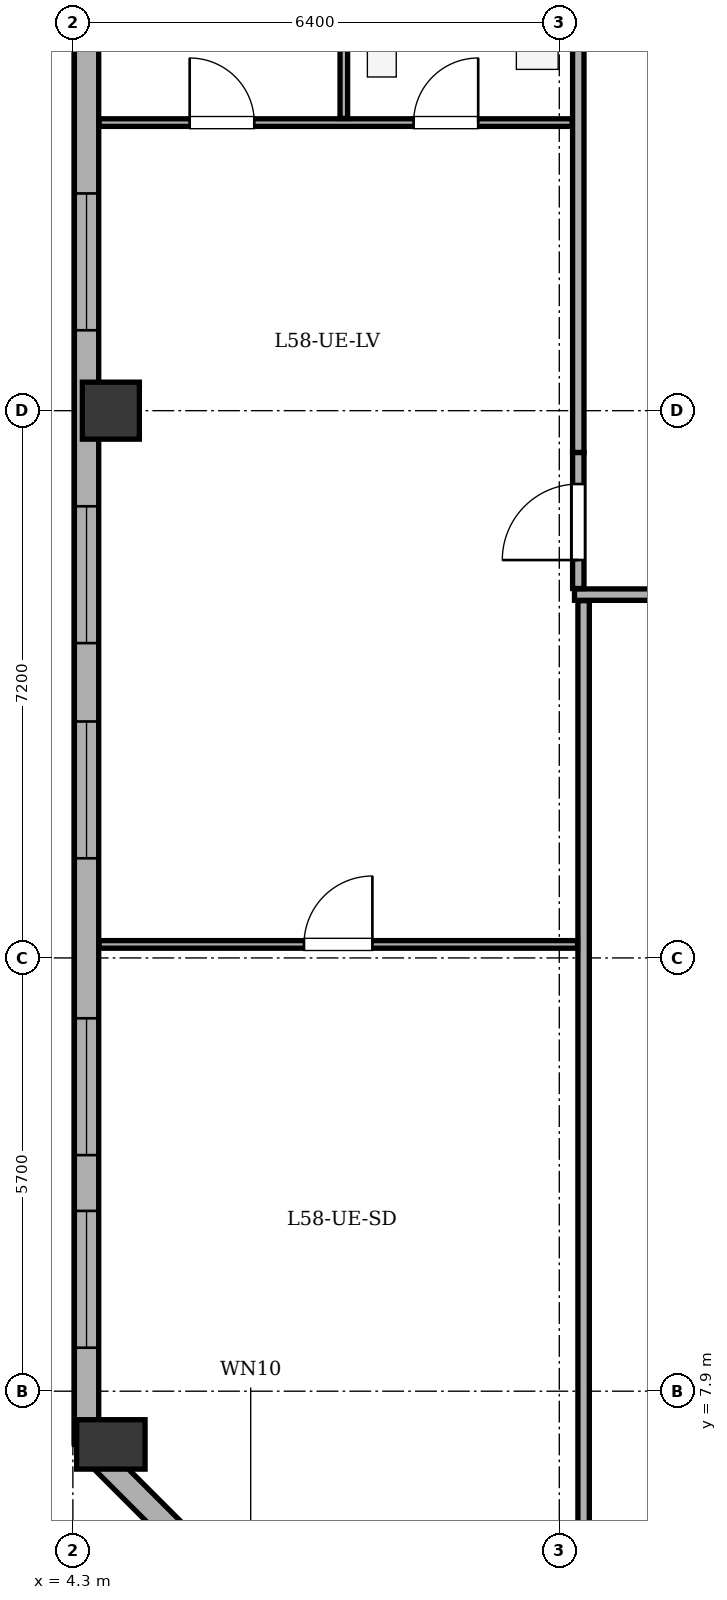
"""IFC4 building model, lengths in metres.
Left out: names, types, materials, properties, quantities, classifications, styles, units other than length and angle.
Written with IfcOpenShell. Run it as: python <this file> out.ifc"""

import sys

from ifc_helpers import new_model, si_unit, direction, frame, frame_2d, origin, origin_2d, place, context, subcontext, project, spatial, rectangle, extrude, element, fill, save


model = new_model("IFC4")
c1 = context("Model", 3, precision=1e-05, world=origin(), true_north=direction((0.0, 1.0)))
c2 = subcontext(c1, "Body", "Model", "MODEL_VIEW")
j1 = project(units=[si_unit("LENGTHUNIT", "METRE"), si_unit("PLANEANGLEUNIT", "RADIAN")], contexts=[c1])
p1 = place(None, origin())
s1 = spatial("IfcSite", under=j1, at=p1, CompositionType="ELEMENT")
p2 = place(p1, origin())
s2 = spatial("IfcBuilding", under=s1, at=p2, CompositionType="ELEMENT")
p3 = place(p2, frame((0.0, 0.0, 224.5)))
s3 = spatial("IfcBuildingStorey", under=s2, at=p3, CompositionType="ELEMENT", Elevation=224.5)
p4 = place(p3, frame((4.8, 7.2, 0.0), z_axis=(0.0, 0.0, 1.0), x_axis=(1.0, 0.0, 0.0)))
e1 = element("IfcColumn", 1, at=p4, inside=s3, PredefinedType="COLUMN", context=c2, shape_type="SweptSolid", body=[
    extrude(rectangle(XDim=0.65, YDim=0.9, at=origin_2d()), origin(), (0.0, 0.0, 1.0), 3.4),
])
p5 = place(p3, frame((4.8, 20.8, 0.0), z_axis=(0.0, 0.0, 1.0), x_axis=(1.0, 0.0, 0.0)))
e2 = element("IfcColumn", 2, at=p5, inside=s3, PredefinedType="COLUMN", context=c2, shape_type="SweptSolid", body=[
    extrude(rectangle(XDim=0.75, YDim=0.75, at=origin_2d()), origin(), (0.0, 0.0, 1.0), 3.4),
])
p6 = place(p3, frame((8.8, 2.88, 0.0), z_axis=(0.0, 0.0, 1.0), x_axis=(-0.707106781187, 0.707106781187, 0.0)))
e3 = element("IfcWall", 3, at=p6, inside=s3, PredefinedType="STANDARD", context=c2, shape_type="SweptSolid", body=[
    extrude(rectangle(XDim=6.11, YDim=0.32, at=frame_2d((3.055, 0.0))), origin(), (0.0, 0.0, 1.0), 2.335),
])
p7 = place(p6, frame((2.355, 0.0, 0.75)))
e4 = element("IfcOpeningElement", 4, at=p7, cuts=e3, PredefinedType="OPENING", context=c2, shape_type="SweptSolid", body=[
    extrude(rectangle(XDim=1.4, YDim=1.465, at=frame_2d((0.7, 0.732))), frame((0.0, 0.17, 0.0), z_axis=(0.0, -1.0, 0.0), x_axis=(1.0, 0.0, 0.0)), (0.0, 0.0, 1.0), 0.34),
])
p8 = place(p3, frame((4.48, 7.2, 0.0), z_axis=(0.0, 0.0, 1.0), x_axis=(0.0, 1.0, 0.0)))
e5 = element("IfcWall", 5, at=p8, inside=s3, PredefinedType="STANDARD", context=c2, shape_type="SweptSolid", body=[
    extrude(rectangle(XDim=27.8, YDim=0.32, at=frame_2d((13.9, 0.0))), origin(), (0.0, 0.0, 1.0), 2.335),
])
p9 = place(p8, frame((1.272, 0.0, 0.75)))
e6 = element("IfcOpeningElement", 6, at=p9, cuts=e5, PredefinedType="OPENING", context=c2, shape_type="SweptSolid", body=[
    extrude(rectangle(XDim=1.8, YDim=1.465, at=frame_2d((0.9, 0.732))), frame((0.0, 0.17, 0.0), z_axis=(0.0, -1.0, 0.0), x_axis=(1.0, 0.0, 0.0)), (0.0, 0.0, 1.0), 0.34),
])
p10 = place(p8, frame((3.806, 0.0, 0.75)))
e7 = element("IfcOpeningElement", 7, at=p10, cuts=e5, PredefinedType="OPENING", context=c2, shape_type="SweptSolid", body=[
    extrude(rectangle(XDim=1.8, YDim=1.465, at=frame_2d((0.9, 0.732))), frame((0.0, 0.17, 0.0), z_axis=(0.0, -1.0, 0.0), x_axis=(1.0, 0.0, 0.0)), (0.0, 0.0, 1.0), 0.34),
])
p11 = place(p8, frame((7.711, 0.0, 0.75)))
e8 = element("IfcOpeningElement", 8, at=p11, cuts=e5, PredefinedType="OPENING", context=c2, shape_type="SweptSolid", body=[
    extrude(rectangle(XDim=1.8, YDim=1.465, at=frame_2d((0.9, 0.732))), frame((0.0, 0.17, 0.0), z_axis=(0.0, -1.0, 0.0), x_axis=(1.0, 0.0, 0.0)), (0.0, 0.0, 1.0), 0.34),
])
p12 = place(p8, frame((10.542, 0.0, 0.75)))
e9 = element("IfcOpeningElement", 9, at=p12, cuts=e5, PredefinedType="OPENING", context=c2, shape_type="SweptSolid", body=[
    extrude(rectangle(XDim=1.8, YDim=1.465, at=frame_2d((0.9, 0.732))), frame((0.0, 0.17, 0.0), z_axis=(0.0, -1.0, 0.0), x_axis=(1.0, 0.0, 0.0)), (0.0, 0.0, 1.0), 0.34),
])
p13 = place(p8, frame((14.658, 0.0, 0.75)))
e10 = element("IfcOpeningElement", 10, at=p13, cuts=e5, PredefinedType="OPENING", context=c2, shape_type="SweptSolid", body=[
    extrude(rectangle(XDim=1.8, YDim=1.465, at=frame_2d((0.9, 0.732))), frame((0.0, 0.17, 0.0), z_axis=(0.0, -1.0, 0.0), x_axis=(1.0, 0.0, 0.0)), (0.0, 0.0, 1.0), 0.34),
])
p14 = place(p8, frame((23.543, 0.0, 0.75)))
e11 = element("IfcOpeningElement", 11, at=p14, cuts=e5, PredefinedType="OPENING", context=c2, shape_type="SweptSolid", body=[
    extrude(rectangle(XDim=1.8, YDim=1.465, at=frame_2d((0.9, 0.732))), frame((0.0, 0.17, 0.0), z_axis=(0.0, -1.0, 0.0), x_axis=(1.0, 0.0, 0.0)), (0.0, 0.0, 1.0), 0.34),
])
p15 = place(p3, frame((10.9, 18.38, 0.0), z_axis=(0.0, 0.0, 1.0), x_axis=(1.0, 0.0, 0.0)))
e12 = element("IfcWall", 12, at=p15, inside=s3, PredefinedType="PARTITIONING", context=c2, shape_type="SweptSolid", body=[
    extrude(rectangle(XDim=34.02, YDim=0.15, at=frame_2d((17.01, 0.0))), origin(), (0.0, 0.0, 1.0), 2.95),
])
p16 = place(p15, frame((2.774, 0.0, 0.0)))
e13 = element("IfcOpeningElement", 13, at=p16, cuts=e12, PredefinedType="OPENING", context=c2, shape_type="SweptSolid", body=[
    extrude(rectangle(XDim=1.0, YDim=2.1, at=frame_2d((0.5, 1.05))), frame((0.0, 0.085, 0.0), z_axis=(0.0, -1.0, 0.0), x_axis=(1.0, 0.0, 0.0)), (0.0, 0.0, 1.0), 0.17),
])
p17 = place(p15, frame((12.118, 0.0, 0.0)))
e14 = element("IfcOpeningElement", 14, at=p17, cuts=e12, PredefinedType="OPENING", context=c2, shape_type="SweptSolid", body=[
    extrude(rectangle(XDim=1.0, YDim=2.1, at=frame_2d((0.5, 1.05))), frame((0.0, 0.085, 0.0), z_axis=(0.0, -1.0, 0.0), x_axis=(1.0, 0.0, 0.0)), (0.0, 0.0, 1.0), 0.17),
])
p18 = place(p15, frame((20.901, 0.0, 0.0)))
e15 = element("IfcOpeningElement", 15, at=p18, cuts=e12, PredefinedType="OPENING", context=c2, shape_type="SweptSolid", body=[
    extrude(rectangle(XDim=1.0, YDim=2.1, at=frame_2d((0.5, 1.05))), frame((0.0, 0.085, 0.0), z_axis=(0.0, -1.0, 0.0), x_axis=(1.0, 0.0, 0.0)), (0.0, 0.0, 1.0), 0.17),
])
p19 = place(p15, frame((29.346, 0.0, 0.0)))
e16 = element("IfcOpeningElement", 16, at=p19, cuts=e12, PredefinedType="OPENING", context=c2, shape_type="SweptSolid", body=[
    extrude(rectangle(XDim=1.0, YDim=2.1, at=frame_2d((0.5, 1.05))), frame((0.0, 0.085, 0.0), z_axis=(0.0, -1.0, 0.0), x_axis=(1.0, 0.0, 0.0)), (0.0, 0.0, 1.0), 0.17),
])
p20 = place(p3, frame((11.02, 3.045, 0.0), z_axis=(0.0, 0.0, 1.0), x_axis=(0.0, 1.0, 0.0)))
e17 = element("IfcWall", 17, at=p20, inside=s3, PredefinedType="PARTITIONING", context=c2, shape_type="SweptSolid", body=[
    extrude(rectangle(XDim=15.255, YDim=0.15, at=frame_2d((7.627, 0.0))), origin(), (0.0, 0.0, 1.0), 2.335),
])
p21 = place(p3, frame((10.95, 18.46, 0.0), z_axis=(0.0, 0.0, 1.0), x_axis=(0.0, 1.0, 0.0)))
e18 = element("IfcWall", 18, at=p21, inside=s3, PredefinedType="PARTITIONING", context=c2, shape_type="SweptSolid", body=[
    extrude(rectangle(XDim=1.79, YDim=0.15, at=frame_2d((0.895, 0.0))), origin(), (0.0, 0.0, 1.0), 2.335),
])
p22 = place(p21, frame((0.375, 0.0, 0.0)))
e19 = element("IfcOpeningElement", 19, at=p22, cuts=e18, PredefinedType="OPENING", context=c2, shape_type="SweptSolid", body=[
    extrude(rectangle(XDim=1.0, YDim=2.1, at=frame_2d((0.5, 1.05))), frame((0.0, 0.085, 0.0), z_axis=(0.0, -1.0, 0.0), x_axis=(1.0, 0.0, 0.0)), (0.0, 0.0, 1.0), 0.17),
])
p23 = place(p3, frame((10.95, 20.25, 0.0), z_axis=(0.0, 0.0, 1.0), x_axis=(0.0, 1.0, 0.0)))
e20 = element("IfcWall", 20, at=p23, inside=s3, PredefinedType="PARTITIONING", context=c2, shape_type="SweptSolid", body=[
    extrude(rectangle(XDim=13.9, YDim=0.15, at=frame_2d((6.95, 0.0))), origin(), (0.0, 0.0, 1.0), 2.335),
])
p24 = place(p3, frame((4.645, 24.59, 0.0), z_axis=(0.0, 0.0, 1.0), x_axis=(1.0, 0.0, 0.0)))
e21 = element("IfcWall", 21, at=p24, inside=s3, PredefinedType="PARTITIONING", context=c2, shape_type="SweptSolid", body=[
    extrude(rectangle(XDim=6.225, YDim=0.1, at=frame_2d((3.113, 0.0))), origin(), (0.0, 0.0, 1.0), 2.95),
])
p25 = place(p24, frame((1.192, 0.0, 0.0)))
e22 = element("IfcOpeningElement", 22, at=p25, cuts=e21, PredefinedType="OPENING", context=c2, shape_type="SweptSolid", body=[
    extrude(rectangle(XDim=0.85, YDim=2.05, at=frame_2d((0.425, 1.025))), frame((0.0, 0.06, 0.0), z_axis=(0.0, -1.0, 0.0), x_axis=(1.0, 0.0, 0.0)), (0.0, 0.0, 1.0), 0.12),
])
p26 = place(p24, frame((4.138, 0.0, 0.0)))
e23 = element("IfcOpeningElement", 23, at=p26, cuts=e21, PredefinedType="OPENING", context=c2, shape_type="SweptSolid", body=[
    extrude(rectangle(XDim=0.85, YDim=2.05, at=frame_2d((0.425, 1.025))), frame((0.0, 0.06, 0.0), z_axis=(0.0, -1.0, 0.0), x_axis=(1.0, 0.0, 0.0)), (0.0, 0.0, 1.0), 0.12),
])
p27 = place(p3, frame((4.645, 13.778, 0.0), z_axis=(0.0, 0.0, 1.0), x_axis=(1.0, 0.0, 0.0)))
e24 = element("IfcWall", 24, at=p27, inside=s3, PredefinedType="PARTITIONING", context=c2, shape_type="SweptSolid", body=[
    extrude(rectangle(XDim=6.295, YDim=0.1, at=frame_2d((3.147, 0.0))), origin(), (0.0, 0.0, 1.0), 2.95),
])
p28 = place(p27, frame((2.696, 0.0, 0.0)))
e25 = element("IfcOpeningElement", 25, at=p28, cuts=e24, PredefinedType="OPENING", context=c2, shape_type="SweptSolid", body=[
    extrude(rectangle(XDim=0.9, YDim=2.05, at=frame_2d((0.45, 1.025))), frame((0.0, 0.06, 0.0), z_axis=(0.0, -1.0, 0.0), x_axis=(1.0, 0.0, 0.0)), (0.0, 0.0, 1.0), 0.12),
])
p29 = place(p3, frame((7.865, 24.645, 0.0), z_axis=(0.0, 0.0, 1.0), x_axis=(0.0, 1.0, 0.0)))
e26 = element("IfcWall", 26, at=p29, inside=s3, PredefinedType="PARTITIONING", context=c2, shape_type="SweptSolid", body=[
    extrude(rectangle(XDim=2.475, YDim=0.1, at=frame_2d((1.238, 0.0))), origin(), (0.0, 0.0, 1.0), 2.95),
])
p30 = place(p9, origin())
e27 = element("IfcWindow", 27, at=p30, inside=s3, PartitioningType="SINGLE_PANEL", PredefinedType="WINDOW", context=c2, shape_type="SweptSolid", body=[
    extrude(rectangle(XDim=1.8, YDim=1.465, at=frame_2d((0.9, 0.732))), frame((0.0, -0.01, 0.0), z_axis=(0.0, -1.0, 0.0), x_axis=(1.0, 0.0, 0.0)), (0.0, 0.0, 1.0), 0.06),
])
fill(e6, e27)
p31 = place(p10, origin())
e28 = element("IfcWindow", 28, at=p31, inside=s3, PartitioningType="SINGLE_PANEL", PredefinedType="WINDOW", context=c2, shape_type="SweptSolid", body=[
    extrude(rectangle(XDim=1.8, YDim=1.465, at=frame_2d((0.9, 0.732))), frame((0.0, -0.01, 0.0), z_axis=(0.0, -1.0, 0.0), x_axis=(1.0, 0.0, 0.0)), (0.0, 0.0, 1.0), 0.06),
])
fill(e7, e28)
p32 = place(p11, origin())
e29 = element("IfcWindow", 29, at=p32, inside=s3, PartitioningType="SINGLE_PANEL", PredefinedType="WINDOW", context=c2, shape_type="SweptSolid", body=[
    extrude(rectangle(XDim=1.8, YDim=1.465, at=frame_2d((0.9, 0.732))), frame((0.0, -0.01, 0.0), z_axis=(0.0, -1.0, 0.0), x_axis=(1.0, 0.0, 0.0)), (0.0, 0.0, 1.0), 0.06),
])
fill(e8, e29)
p33 = place(p12, origin())
e30 = element("IfcWindow", 30, at=p33, inside=s3, PartitioningType="SINGLE_PANEL", PredefinedType="WINDOW", context=c2, shape_type="SweptSolid", body=[
    extrude(rectangle(XDim=1.8, YDim=1.465, at=frame_2d((0.9, 0.732))), frame((0.0, -0.01, 0.0), z_axis=(0.0, -1.0, 0.0), x_axis=(1.0, 0.0, 0.0)), (0.0, 0.0, 1.0), 0.06),
])
fill(e9, e30)
p34 = place(p13, origin())
e31 = element("IfcWindow", 31, at=p34, inside=s3, PartitioningType="SINGLE_PANEL", PredefinedType="WINDOW", context=c2, shape_type="SweptSolid", body=[
    extrude(rectangle(XDim=1.8, YDim=1.465, at=frame_2d((0.9, 0.732))), frame((0.0, -0.01, 0.0), z_axis=(0.0, -1.0, 0.0), x_axis=(1.0, 0.0, 0.0)), (0.0, 0.0, 1.0), 0.06),
])
fill(e10, e31)
p35 = place(p22, origin())
e32 = element("IfcDoor", 32, at=p35, inside=s3, OperationType="SINGLE_SWING_LEFT", PredefinedType="DOOR", context=c2, shape_type="SweptSolid", body=[
    extrude(rectangle(XDim=1.0, YDim=2.1, at=frame_2d((0.5, 1.05))), frame((0.0, 0.025, 0.0), z_axis=(0.0, -1.0, 0.0), x_axis=(1.0, 0.0, 0.0)), (0.0, 0.0, 1.0), 0.05),
])
fill(e19, e32)
p36 = place(p28, origin())
e33 = element("IfcDoor", 33, at=p36, inside=s3, OperationType="SINGLE_SWING_RIGHT", PredefinedType="DOOR", context=c2, shape_type="SweptSolid", body=[
    extrude(rectangle(XDim=0.9, YDim=2.05, at=frame_2d((0.45, 1.025))), frame((0.0, 0.025, 0.0), z_axis=(0.0, -1.0, 0.0), x_axis=(1.0, 0.0, 0.0)), (0.0, 0.0, 1.0), 0.05),
])
fill(e25, e33)
p37 = place(p25, origin())
e34 = element("IfcDoor", 34, at=p37, inside=s3, OperationType="SINGLE_SWING_LEFT", PredefinedType="DOOR", context=c2, shape_type="SweptSolid", body=[
    extrude(rectangle(XDim=0.85, YDim=2.05, at=frame_2d((0.425, 1.025))), frame((0.0, 0.025, 0.0), z_axis=(0.0, -1.0, 0.0), x_axis=(1.0, 0.0, 0.0)), (0.0, 0.0, 1.0), 0.05),
])
fill(e22, e34)
p38 = place(p26, origin())
e35 = element("IfcDoor", 35, at=p38, inside=s3, OperationType="SINGLE_SWING_RIGHT", PredefinedType="DOOR", context=c2, shape_type="SweptSolid", body=[
    extrude(rectangle(XDim=0.85, YDim=2.05, at=frame_2d((0.425, 1.025))), frame((0.0, 0.025, 0.0), z_axis=(0.0, -1.0, 0.0), x_axis=(1.0, 0.0, 0.0)), (0.0, 0.0, 1.0), 0.05),
])
fill(e23, e35)
save(model, sys.argv[1])
